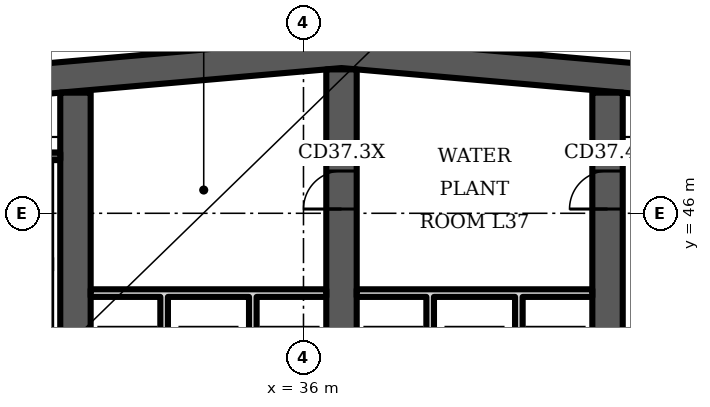
"""IFC4 building model, lengths in metres.
Left out: names, types, materials, properties, quantities, classifications, styles, units other than length and angle.
Written with IfcOpenShell. Run it as: python <this file> out.ifc"""

import sys

from ifc_helpers import new_model, si_unit, direction, frame, frame_2d, origin, place, context, subcontext, project, spatial, polyline, rectangle, outline, extrude, element, fill, save


model = new_model("IFC4")
c1 = context("Model", 3, precision=1e-05, world=origin(), true_north=direction((0.0, 1.0)))
c2 = subcontext(c1, "Body", "Model", "MODEL_VIEW")
j1 = project(units=[si_unit("LENGTHUNIT", "METRE"), si_unit("PLANEANGLEUNIT", "RADIAN")], contexts=[c1])
p1 = place(None, origin())
s1 = spatial("IfcSite", under=j1, at=p1, CompositionType="ELEMENT")
p2 = place(p1, origin())
s2 = spatial("IfcBuilding", under=s1, at=p2, CompositionType="ELEMENT")
p3 = place(p2, frame((0.0, 0.0, 155.5)))
s3 = spatial("IfcBuildingStorey", under=s2, at=p3, CompositionType="ELEMENT", Elevation=155.5)
p4 = place(p3, origin())
e1 = element("IfcWall", 1, at=p4, inside=s3, PredefinedType="SHEAR", context=c2, shape_type="SweptSolid", body=[
    extrude(outline(polyline([(16.0, 47.984), (37.0, 49.822), (58.0, 47.984), (58.0, 48.787), (37.0, 50.625), (16.0, 48.787), (16.0, 47.984)])), origin(), (0.0, 0.0, 1.0), 3.6),
])
p5 = place(p3, frame((30.0, 34.8, 0.0), z_axis=(0.0, 0.0, 1.0), x_axis=(0.0, 1.0, 0.0)))
e2 = element("IfcWall", 2, at=p5, inside=s3, PredefinedType="SHEAR", context=c2, shape_type="SweptSolid", body=[
    extrude(rectangle(XDim=14.374, YDim=0.8, at=frame_2d((7.187, 0.0))), origin(), (0.0, 0.0, 1.0), 3.6),
])
p6 = place(p5, frame((3.6, 0.0, 0.0)))
e3 = element("IfcOpeningElement", 3, at=p6, cuts=e2, PredefinedType="OPENING", context=c2, shape_type="SweptSolid", body=[
    extrude(rectangle(XDim=1.1, YDim=2.1, at=frame_2d((0.55, 1.05))), frame((0.0, 0.41, 0.0), z_axis=(0.0, -1.0, 0.0), x_axis=(1.0, 0.0, 0.0)), (0.0, 0.0, 1.0), 0.82),
])
p7 = place(p3, frame((37.0, 34.8, 0.0), z_axis=(0.0, 0.0, 1.0), x_axis=(0.0, 1.0, 0.0)))
e4 = element("IfcWall", 4, at=p7, inside=s3, PredefinedType="SHEAR", context=c2, shape_type="SweptSolid", body=[
    extrude(rectangle(XDim=14.987, YDim=0.8, at=frame_2d((7.493, 0.0))), origin(), (0.0, 0.0, 1.0), 3.6),
])
p8 = place(p7, frame((11.312, 0.0, 0.0)))
e5 = element("IfcOpeningElement", 5, at=p8, cuts=e4, PredefinedType="OPENING", context=c2, shape_type="SweptSolid", body=[
    extrude(rectangle(XDim=1.0, YDim=2.1, at=frame_2d((0.5, 1.05))), frame((0.0, 0.41, 0.0), z_axis=(0.0, -1.0, 0.0), x_axis=(1.0, 0.0, 0.0)), (0.0, 0.0, 1.0), 0.82),
])
p9 = place(p7, frame((3.6, 0.0, 0.0)))
e6 = element("IfcOpeningElement", 6, at=p9, cuts=e4, PredefinedType="OPENING", context=c2, shape_type="SweptSolid", body=[
    extrude(rectangle(XDim=1.1, YDim=2.1, at=frame_2d((0.55, 1.05))), frame((0.0, 0.41, 0.0), z_axis=(0.0, -1.0, 0.0), x_axis=(1.0, 0.0, 0.0)), (0.0, 0.0, 1.0), 0.82),
])
p10 = place(p3, frame((44.0, 34.8, 0.0), z_axis=(0.0, 0.0, 1.0), x_axis=(0.0, 1.0, 0.0)))
e7 = element("IfcWall", 7, at=p10, inside=s3, PredefinedType="SHEAR", context=c2, shape_type="SweptSolid", body=[
    extrude(rectangle(XDim=14.374, YDim=0.8, at=frame_2d((7.187, 0.0))), origin(), (0.0, 0.0, 1.0), 3.6),
])
p11 = place(p10, frame((11.312, 0.0, 0.0)))
e8 = element("IfcOpeningElement", 8, at=p11, cuts=e7, PredefinedType="OPENING", context=c2, shape_type="SweptSolid", body=[
    extrude(rectangle(XDim=1.0, YDim=2.1, at=frame_2d((0.5, 1.05))), frame((0.0, 0.41, 0.0), z_axis=(0.0, -1.0, 0.0), x_axis=(1.0, 0.0, 0.0)), (0.0, 0.0, 1.0), 0.82),
])
p12 = place(p10, frame((3.6, 0.0, 0.0)))
e9 = element("IfcOpeningElement", 9, at=p12, cuts=e7, PredefinedType="OPENING", context=c2, shape_type="SweptSolid", body=[
    extrude(rectangle(XDim=1.1, YDim=2.1, at=frame_2d((0.55, 1.05))), frame((0.0, 0.41, 0.0), z_axis=(0.0, -1.0, 0.0), x_axis=(1.0, 0.0, 0.0)), (0.0, 0.0, 1.0), 0.82),
])
p13 = place(p3, frame((25.75, 47.5, 0.0), z_axis=(0.0, 0.0, 1.0), x_axis=(1.0, 0.0, 0.0)))
e10 = element("IfcWall", 10, at=p13, inside=s3, PredefinedType="SHEAR", context=c2, shape_type="SweptSolid", body=[
    extrude(rectangle(XDim=3.85, YDim=0.2, at=frame_2d((1.925, 0.0))), origin(), (0.0, 0.0, 1.0), 3.2),
])
p14 = place(p3, frame((0.0, 0.0, -0.0)))
e11 = element("IfcWall", 11, at=p14, inside=s3, PredefinedType="PARTITIONING", context=c2, shape_type="SweptSolid", body=[
    extrude(outline(polyline([(32.433, 40.8), (32.233, 40.8), (32.233, 43.8), (30.4, 43.8), (30.4, 44.0), (36.6, 44.0), (36.6, 43.8), (34.767, 43.8), (34.767, 40.8), (34.567, 40.8), (34.567, 43.8), (32.433, 43.8), (32.433, 40.8)])), origin(), (0.0, 0.0, 1.0), 3.2),
])
p15 = place(p3, frame((0.0, 0.0, -0.0)))
e12 = element("IfcWall", 12, at=p15, inside=s3, PredefinedType="PARTITIONING", context=c2, shape_type="SweptSolid", body=[
    extrude(outline(polyline([(39.433, 40.8), (39.233, 40.8), (39.233, 43.8), (37.4, 43.8), (37.4, 44.0), (43.6, 44.0), (43.6, 43.8), (41.767, 43.8), (41.767, 40.8), (41.567, 40.8), (41.567, 43.8), (39.433, 43.8), (39.433, 40.8)])), origin(), (0.0, 0.0, 1.0), 3.2),
])
p16 = place(p8, origin())
e13 = element("IfcDoor", 13, at=p16, inside=s3, OperationType="SINGLE_SWING_LEFT", PredefinedType="DOOR", context=c2, shape_type="SweptSolid", body=[
    extrude(rectangle(XDim=1.0, YDim=2.1, at=frame_2d((0.5, 1.05))), frame((0.0, 0.4, 0.0), z_axis=(0.0, -1.0, 0.0), x_axis=(1.0, 0.0, 0.0)), (0.0, 0.0, 1.0), 0.8),
])
fill(e5, e13)
p17 = place(p11, origin())
e14 = element("IfcDoor", 14, at=p17, inside=s3, OperationType="SINGLE_SWING_LEFT", PredefinedType="DOOR", context=c2, shape_type="SweptSolid", body=[
    extrude(rectangle(XDim=1.0, YDim=2.1, at=frame_2d((0.5, 1.05))), frame((0.0, 0.4, 0.0), z_axis=(0.0, -1.0, 0.0), x_axis=(1.0, 0.0, 0.0)), (0.0, 0.0, 1.0), 0.8),
])
fill(e8, e14)
save(model, sys.argv[1])
